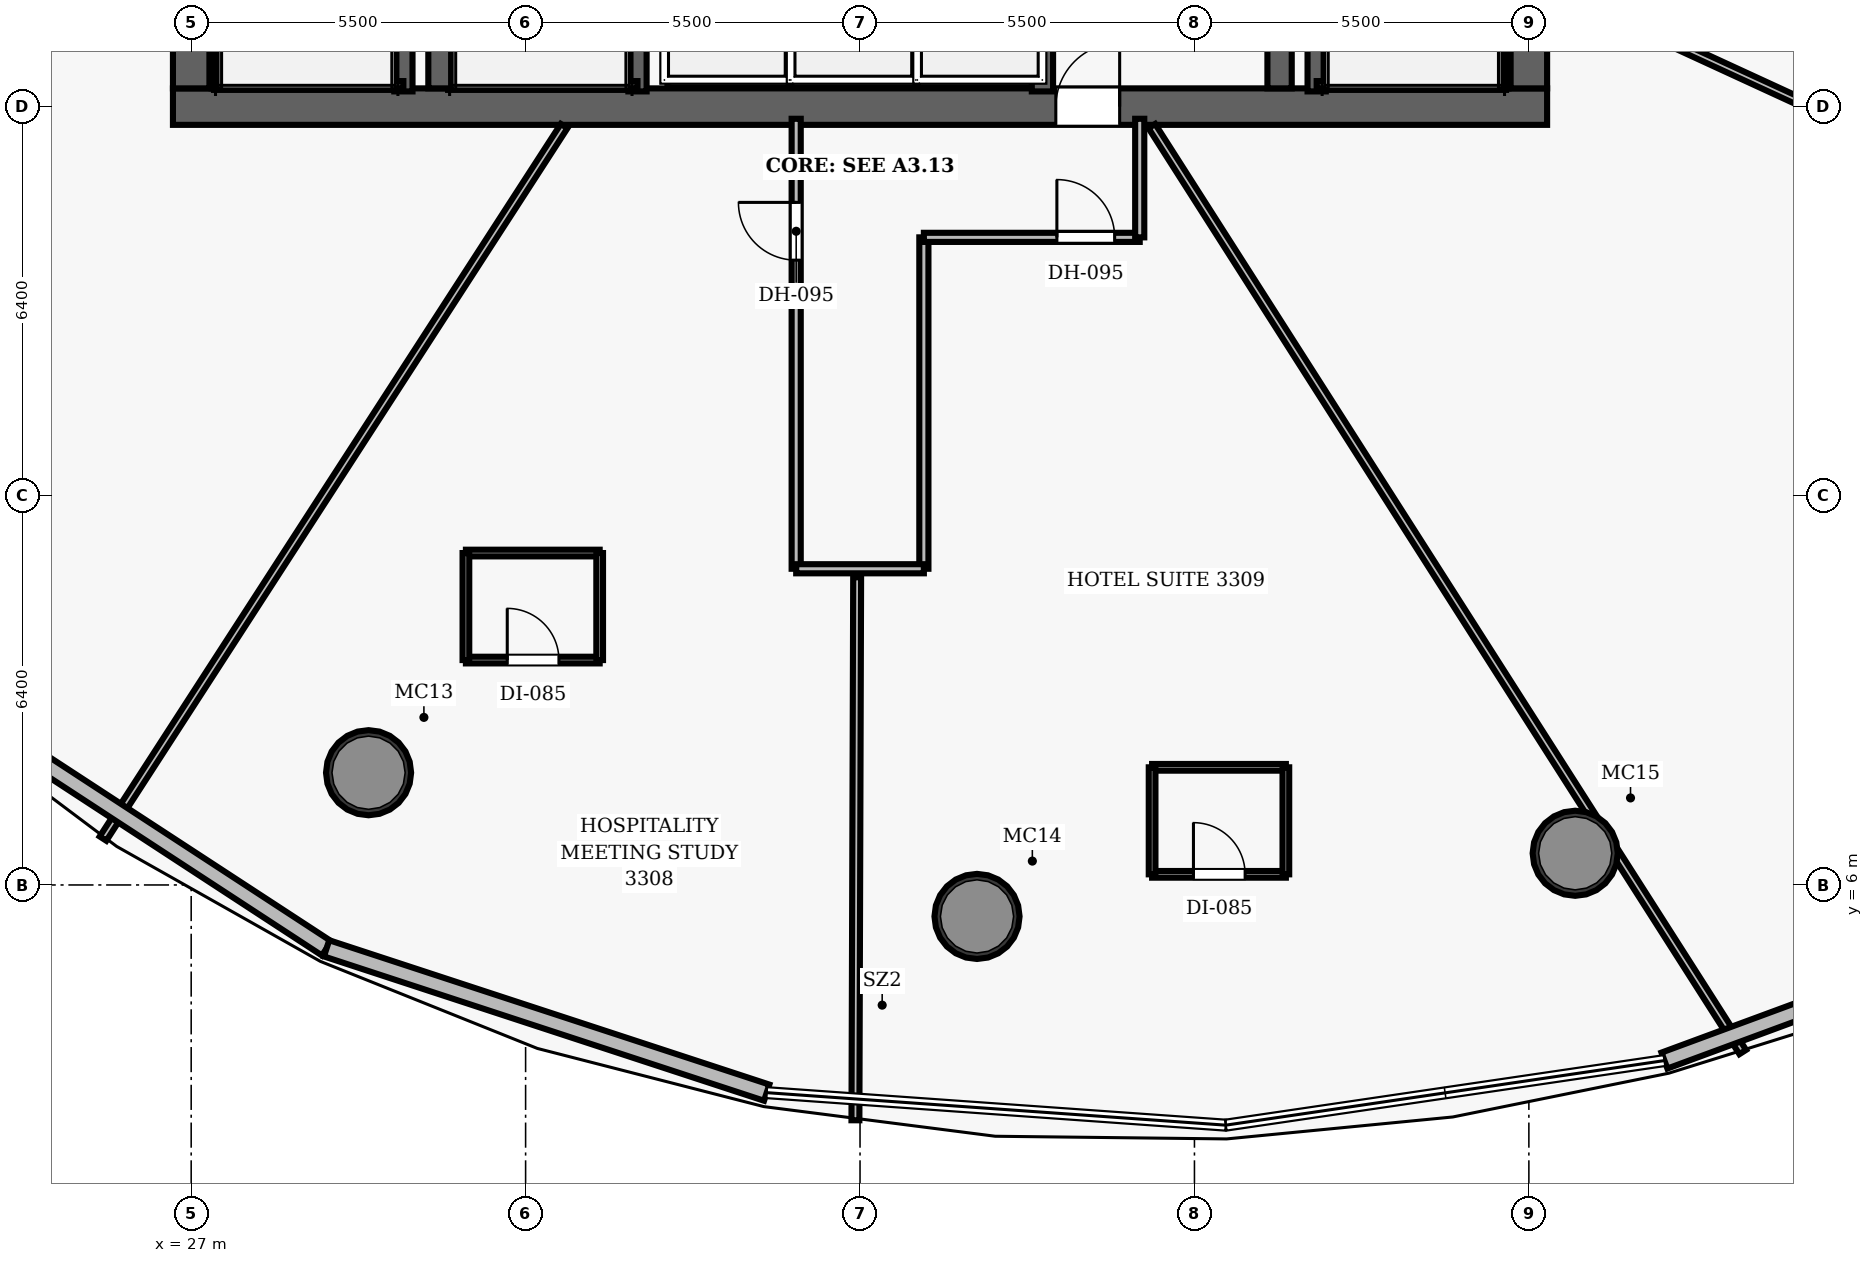
"""IFC4 building model, lengths in metres.
Left out: names, types, materials, properties, quantities, classifications, styles, units other than length and angle.
Written with IfcOpenShell. Run it as: python <this file> out.ifc"""

import sys

from ifc_helpers import new_model, si_unit, direction, frame, frame_2d, origin, origin_2d, place, context, subcontext, project, spatial, rectangle, hollow_circle, extrude, element, fill, save


model = new_model("IFC4")
c1 = context("Model", 3, precision=1e-05, world=origin(), true_north=direction((0.0, 1.0)))
c2 = subcontext(c1, "Body", "Model", "MODEL_VIEW")
j1 = project(units=[si_unit("LENGTHUNIT", "METRE"), si_unit("PLANEANGLEUNIT", "RADIAN")], contexts=[c1])
p1 = place(None, origin())
s1 = spatial("IfcSite", under=j1, at=p1, CompositionType="ELEMENT")
p2 = place(p1, origin())
s2 = spatial("IfcBuilding", under=s1, at=p2, CompositionType="ELEMENT")
p3 = place(p2, frame((0.0, 0.0, 134.3)))
s3 = spatial("IfcBuildingStorey", under=s2, at=p3, CompositionType="ELEMENT", Elevation=134.3)
p4 = place(p3, frame((26.7, 18.8, 0.0), z_axis=(0.0, 0.0, 1.0), x_axis=(1.0, 0.0, 0.0)))
e1 = element("IfcWall", 1, at=p4, inside=s3, PredefinedType="SHEAR", context=c2, shape_type="SweptSolid", body=[
    extrude(rectangle(XDim=22.6, YDim=0.6, at=frame_2d((11.3, 0.0))), origin(), (0.0, 0.0, 1.0), 3.5),
])
p5 = place(p4, frame((14.52, 0.0, 0.0)))
e2 = element("IfcOpeningElement", 2, at=p5, cuts=e1, PredefinedType="OPENING", context=c2, shape_type="SweptSolid", body=[
    extrude(rectangle(XDim=1.05, YDim=2.15, at=frame_2d((0.525, 1.075))), frame((0.0, 0.31, 0.0), z_axis=(0.0, -1.0, 0.0), x_axis=(1.0, 0.0, 0.0)), (0.0, 0.0, 1.0), 0.62),
])
p6 = place(p3, frame((27.0, 19.1, 0.0), z_axis=(0.0, 0.0, 1.0), x_axis=(0.0, 1.0, 0.0)))
e3 = element("IfcWall", 3, at=p6, inside=s3, PredefinedType="SHEAR", context=c2, shape_type="SweptSolid", body=[
    extrude(rectangle(XDim=13.8, YDim=0.6, at=frame_2d((6.9, 0.0))), origin(), (0.0, 0.0, 1.0), 3.5),
])
p7 = place(p6, frame((8.2, 0.0, 0.0)))
e4 = element("IfcOpeningElement", 4, at=p7, cuts=e3, PredefinedType="OPENING", context=c2, shape_type="SweptSolid", body=[
    extrude(rectangle(XDim=1.05, YDim=2.15, at=frame_2d((0.525, 1.075))), frame((0.0, 0.31, 0.0), z_axis=(0.0, -1.0, 0.0), x_axis=(1.0, 0.0, 0.0)), (0.0, 0.0, 1.0), 0.62),
])
p8 = place(p3, frame((49.0, 19.1, 0.0), z_axis=(0.0, 0.0, 1.0), x_axis=(0.0, 1.0, 0.0)))
e5 = element("IfcWall", 5, at=p8, inside=s3, PredefinedType="SHEAR", context=c2, shape_type="SweptSolid", body=[
    extrude(rectangle(XDim=13.8, YDim=0.6, at=frame_2d((6.9, 0.0))), origin(), (0.0, 0.0, 1.0), 3.5),
])
p9 = place(p8, frame((8.2, 0.0, 0.0)))
e6 = element("IfcOpeningElement", 6, at=p9, cuts=e5, PredefinedType="OPENING", context=c2, shape_type="SweptSolid", body=[
    extrude(rectangle(XDim=1.05, YDim=2.15, at=frame_2d((0.525, 1.075))), frame((0.0, 0.31, 0.0), z_axis=(0.0, -1.0, 0.0), x_axis=(1.0, 0.0, 0.0)), (0.0, 0.0, 1.0), 0.62),
])
for number, where, z_axis, x_axis in (
    (7, (31.1, 19.1, 0.0), (0.0, 0.0, 1.0), (0.0, 1.0, 0.0)),
    (8, (44.9, 19.1, 0.0), (0.0, 0.0, 1.0), (0.0, 1.0, 0.0)),
):
    element("IfcWall", number, at=place(p3, frame(where, z_axis=z_axis, x_axis=x_axis)), inside=s3, PredefinedType="SHEAR", context=c2, shape_type="SweptSolid", body=[
        extrude(rectangle(XDim=13.8, YDim=0.4, at=frame_2d((6.9, 0.0))), origin(), (0.0, 0.0, 1.0), 3.5),
    ])
for number, where, z_axis, x_axis in (
    (9, (29.917, 7.846, 0.0), (0.0, 0.0, 1.0), (1.0, 0.0, 0.0)),
    (10, (39.924, 5.483, 0.0), (0.0, 0.0, 1.0), (1.0, 0.0, 0.0)),
    (11, (49.762, 6.521, 0.0), (0.0, 0.0, 1.0), (1.0, 0.0, 0.0)),
):
    element("IfcColumn", number, at=place(p3, frame(where, z_axis=z_axis, x_axis=x_axis)), inside=s3, PredefinedType="COLUMN", context=c2, shape_type="SweptSolid", body=[
        extrude(hollow_circle(Radius=0.7, WallThickness=0.055, at=origin_2d()), origin(), (0.0, 0.0, 1.0), 3.5),
    ])
p10 = place(p3, frame((30.49, 19.05, 0.0), z_axis=(0.0, 0.0, 1.0), x_axis=(0.0, 1.0, 0.0)))
e12 = element("IfcWall", 12, at=p10, inside=s3, PredefinedType="SHEAR", context=c2, shape_type="SweptSolid", body=[
    extrude(rectangle(XDim=7.5, YDim=0.3, at=frame_2d((3.75, 0.0))), origin(), (0.0, 0.0, 1.0), 3.5),
])
p11 = place(p3, frame((27.395, 19.1, 0.0), z_axis=(0.0, 0.0, 1.0), x_axis=(0.0, 1.0, 0.0)))
e13 = element("IfcWall", 13, at=p11, inside=s3, PredefinedType="SHEAR", context=c2, shape_type="SweptSolid", body=[
    extrude(rectangle(XDim=7.45, YDim=0.12, at=frame_2d((3.725, 0.0))), origin(), (0.0, 0.0, 1.0), 3.5),
])
p12 = place(p3, frame((27.395, 19.16, 0.0), z_axis=(0.0, 0.0, 1.0), x_axis=(1.0, 0.0, 0.0)))
e14 = element("IfcWall", 14, at=p12, inside=s3, PredefinedType="SHEAR", context=c2, shape_type="SweptSolid", body=[
    extrude(rectangle(XDim=3.095, YDim=0.12, at=frame_2d((1.547, 0.0))), origin(), (0.0, 0.0, 1.0), 3.5),
])
p13 = place(p3, frame((45.51, 19.05, 0.0), z_axis=(0.0, 0.0, 1.0), x_axis=(0.0, 1.0, 0.0)))
e15 = element("IfcWall", 15, at=p13, inside=s3, PredefinedType="SHEAR", context=c2, shape_type="SweptSolid", body=[
    extrude(rectangle(XDim=7.5, YDim=0.3, at=frame_2d((3.75, 0.0))), origin(), (0.0, 0.0, 1.0), 3.5),
])
p14 = place(p3, frame((48.605, 19.1, 0.0), z_axis=(0.0, 0.0, 1.0), x_axis=(0.0, 1.0, 0.0)))
e16 = element("IfcWall", 16, at=p14, inside=s3, PredefinedType="SHEAR", context=c2, shape_type="SweptSolid", body=[
    extrude(rectangle(XDim=7.45, YDim=0.12, at=frame_2d((3.725, 0.0))), origin(), (0.0, 0.0, 1.0), 3.5),
])
p15 = place(p3, frame((45.51, 19.16, 0.0), z_axis=(0.0, 0.0, 1.0), x_axis=(1.0, 0.0, 0.0)))
e17 = element("IfcWall", 17, at=p15, inside=s3, PredefinedType="SHEAR", context=c2, shape_type="SweptSolid", body=[
    extrude(rectangle(XDim=3.095, YDim=0.12, at=frame_2d((1.547, 0.0))), origin(), (0.0, 0.0, 1.0), 3.5),
])
p16 = place(p3, frame((34.34, 19.05, 0.0), z_axis=(0.0, 0.0, 1.0), x_axis=(0.0, 1.0, 0.0)))
e18 = element("IfcWall", 18, at=p16, inside=s3, PredefinedType="SHEAR", context=c2, shape_type="SweptSolid", body=[
    extrude(rectangle(XDim=7.5, YDim=0.3, at=frame_2d((3.75, 0.0))), origin(), (0.0, 0.0, 1.0), 3.5),
])
p17 = place(p3, frame((31.3, 19.16, 0.0), z_axis=(0.0, 0.0, 1.0), x_axis=(1.0, 0.0, 0.0)))
e19 = element("IfcWall", 19, at=p17, inside=s3, PredefinedType="SHEAR", context=c2, shape_type="SweptSolid", body=[
    extrude(rectangle(XDim=3.04, YDim=0.12, at=frame_2d((1.52, 0.0))), origin(), (0.0, 0.0, 1.0), 3.5),
])
p18 = place(p3, frame((41.0, 19.05, 0.0), z_axis=(0.0, 0.0, 1.0), x_axis=(0.0, 1.0, 0.0)))
e20 = element("IfcWall", 20, at=p18, inside=s3, PredefinedType="SHEAR", context=c2, shape_type="SweptSolid", body=[
    extrude(rectangle(XDim=2.08, YDim=0.35, at=frame_2d((1.04, 0.0))), origin(), (0.0, 0.0, 1.0), 2.675),
])
p19 = place(p3, frame((36.95, 11.2, 0.0), z_axis=(0.0, 0.0, 1.0), x_axis=(0.0, 1.0, 0.0)))
e21 = element("IfcWall", 21, at=p19, inside=s3, PredefinedType="PARTITIONING", context=c2, shape_type="SweptSolid", body=[
    extrude(rectangle(XDim=7.4, YDim=0.15, at=frame_2d((3.7, 0.0))), origin(), (0.0, 0.0, 1.0), 2.675),
])
p20 = place(p19, frame((5.075, 0.0, 0.0)))
e22 = element("IfcOpeningElement", 22, at=p20, cuts=e21, PredefinedType="OPENING", context=c2, shape_type="SweptSolid", body=[
    extrude(rectangle(XDim=0.95, YDim=2.15, at=frame_2d((0.475, 1.075))), frame((0.0, 0.085, 0.0), z_axis=(0.0, -1.0, 0.0), x_axis=(1.0, 0.0, 0.0)), (0.0, 0.0, 1.0), 0.17),
])
p21 = place(p3, frame((39.05, 11.2, 0.0), z_axis=(0.0, 0.0, 1.0), x_axis=(0.0, 1.0, 0.0)))
e23 = element("IfcWall", 23, at=p21, inside=s3, PredefinedType="PARTITIONING", context=c2, shape_type="SweptSolid", body=[
    extrude(rectangle(XDim=5.45, YDim=0.15, at=frame_2d((2.725, 0.0))), origin(), (0.0, 0.0, 1.0), 2.675),
])
p22 = place(p3, frame((39.05, 16.65, 0.0), z_axis=(0.0, 0.0, 1.0), x_axis=(1.0, 0.0, 0.0)))
e24 = element("IfcWall", 24, at=p22, inside=s3, PredefinedType="PARTITIONING", context=c2, shape_type="SweptSolid", body=[
    extrude(rectangle(XDim=3.55, YDim=0.15, at=frame_2d((1.775, 0.0))), origin(), (0.0, 0.0, 1.0), 2.675),
])
p23 = place(p22, frame((2.188, 0.0, 0.0)))
e25 = element("IfcOpeningElement", 25, at=p23, cuts=e24, PredefinedType="OPENING", context=c2, shape_type="SweptSolid", body=[
    extrude(rectangle(XDim=0.95, YDim=2.15, at=frame_2d((0.475, 1.075))), frame((0.0, 0.085, 0.0), z_axis=(0.0, -1.0, 0.0), x_axis=(1.0, 0.0, 0.0)), (0.0, 0.0, 1.0), 0.17),
])
p24 = place(p3, frame((42.6, 16.65, 0.0), z_axis=(0.0, 0.0, 1.0), x_axis=(0.0, 1.0, 0.0)))
e26 = element("IfcWall", 26, at=p24, inside=s3, PredefinedType="PARTITIONING", context=c2, shape_type="SweptSolid", body=[
    extrude(rectangle(XDim=1.95, YDim=0.15, at=frame_2d((0.975, 0.0))), origin(), (0.0, 0.0, 1.0), 2.675),
])
p25 = place(p3, frame((36.95, 11.2, 0.0), z_axis=(0.0, 0.0, 1.0), x_axis=(1.0, 0.0, 0.0)))
e27 = element("IfcWall", 27, at=p25, inside=s3, PredefinedType="PARTITIONING", context=c2, shape_type="SweptSolid", body=[
    extrude(rectangle(XDim=2.1, YDim=0.15, at=frame_2d((1.05, 0.0))), origin(), (0.0, 0.0, 1.0), 2.675),
])
p26 = place(p3, frame((26.68, 20.874, 0.0), z_axis=(0.0, 0.0, 1.0), x_axis=(-0.910944210003, -0.412529570166, 0.0)))
e28 = element("IfcWall", 28, at=p26, inside=s3, PredefinedType="PARTITIONING", context=c2, shape_type="SweptSolid", body=[
    extrude(rectangle(XDim=11.285, YDim=0.13, at=frame_2d((5.643, 0.0))), origin(), (0.0, 0.0, 1.0), 2.675),
])
p27 = place(p3, frame((33.133, 18.48, 0.0), z_axis=(0.0, 0.0, 1.0), x_axis=(-0.543297694795, -0.839540121037, 0.0)))
e29 = element("IfcWall", 29, at=p27, inside=s3, PredefinedType="PARTITIONING", context=c2, shape_type="SweptSolid", body=[
    extrude(rectangle(XDim=13.957, YDim=0.13, at=frame_2d((6.979, 0.0))), origin(), (0.0, 0.0, 1.0), 2.675),
])
p28 = place(p3, frame((37.953, 11.06, 0.0), z_axis=(0.0, 0.0, 1.0), x_axis=(-0.00317137591, -0.999994971175, 0.0)))
e30 = element("IfcWall", 30, at=p28, inside=s3, PredefinedType="PARTITIONING", context=c2, shape_type="SweptSolid", body=[
    extrude(rectangle(XDim=8.93, YDim=0.13, at=frame_2d((4.465, 0.0))), origin(), (0.0, 0.0, 1.0), 2.675),
])
p29 = place(p3, frame((42.799, 18.48, 0.0), z_axis=(0.0, 0.0, 1.0), x_axis=(0.537959445607, -0.842970720063, 0.0)))
e31 = element("IfcWall", 31, at=p29, inside=s3, PredefinedType="PARTITIONING", context=c2, shape_type="SweptSolid", body=[
    extrude(rectangle(XDim=18.064, YDim=0.13, at=frame_2d((9.032, 0.0))), origin(), (0.0, 0.0, 1.0), 2.675),
])
p30 = place(p3, frame((49.32, 20.787, 0.0), z_axis=(0.0, 0.0, 1.0), x_axis=(0.908308798859, -0.418300281993, 0.0)))
e32 = element("IfcWall", 32, at=p30, inside=s3, PredefinedType="PARTITIONING", context=c2, shape_type="SweptSolid", body=[
    extrude(rectangle(XDim=18.123, YDim=0.13, at=frame_2d((9.062, 0.0))), origin(), (0.0, 0.0, 1.0), 2.675),
])
p31 = place(p3, frame((31.518, 9.698, 0.0), z_axis=(0.0, 0.0, 1.0), x_axis=(1.0, 0.0, 0.0)))
e33 = element("IfcWall", 33, at=p31, inside=s3, PredefinedType="PARTITIONING", context=c2, shape_type="SweptSolid", body=[
    extrude(rectangle(XDim=2.2, YDim=0.11, at=frame_2d((1.1, 0.0))), origin(), (0.0, 0.0, 1.0), 2.675),
])
p32 = place(p31, frame((0.68, 0.0, 0.0)))
e34 = element("IfcOpeningElement", 34, at=p32, cuts=e33, PredefinedType="OPENING", context=c2, shape_type="SweptSolid", body=[
    extrude(rectangle(XDim=0.85, YDim=2.1, at=frame_2d((0.425, 1.05))), frame((0.0, 0.065, 0.0), z_axis=(0.0, -1.0, 0.0), x_axis=(1.0, 0.0, 0.0)), (0.0, 0.0, 1.0), 0.13),
])
p33 = place(p3, frame((31.518, 11.458, 0.0), z_axis=(0.0, 0.0, 1.0), x_axis=(1.0, 0.0, 0.0)))
e35 = element("IfcWall", 35, at=p33, inside=s3, PredefinedType="PARTITIONING", context=c2, shape_type="SweptSolid", body=[
    extrude(rectangle(XDim=2.2, YDim=0.11, at=frame_2d((1.1, 0.0))), origin(), (0.0, 0.0, 1.0), 2.675),
])
for number, where, z_axis, x_axis in (
    (36, (31.518, 9.698, 0.0), (0.0, 0.0, 1.0), (0.0, 1.0, 0.0)),
    (37, (33.718, 9.698, 0.0), (0.0, 0.0, 1.0), (0.0, 1.0, 0.0)),
):
    element("IfcWall", number, at=place(p3, frame(where, z_axis=z_axis, x_axis=x_axis)), inside=s3, PredefinedType="PARTITIONING", context=c2, shape_type="SweptSolid", body=[
        extrude(rectangle(XDim=1.76, YDim=0.11, at=frame_2d((0.88, 0.0))), origin(), (0.0, 0.0, 1.0), 2.675),
    ])
p34 = place(p3, frame((42.803, 6.175, 0.0), z_axis=(0.0, 0.0, 1.0), x_axis=(1.0, 0.0, 0.0)))
e38 = element("IfcWall", 38, at=p34, inside=s3, PredefinedType="PARTITIONING", context=c2, shape_type="SweptSolid", body=[
    extrude(rectangle(XDim=2.2, YDim=0.11, at=frame_2d((1.1, 0.0))), origin(), (0.0, 0.0, 1.0), 2.675),
])
p35 = place(p34, frame((0.68, 0.0, 0.0)))
e39 = element("IfcOpeningElement", 39, at=p35, cuts=e38, PredefinedType="OPENING", context=c2, shape_type="SweptSolid", body=[
    extrude(rectangle(XDim=0.85, YDim=2.1, at=frame_2d((0.425, 1.05))), frame((0.0, 0.065, 0.0), z_axis=(0.0, -1.0, 0.0), x_axis=(1.0, 0.0, 0.0)), (0.0, 0.0, 1.0), 0.13),
])
p36 = place(p3, frame((42.803, 7.935, 0.0), z_axis=(0.0, 0.0, 1.0), x_axis=(1.0, 0.0, 0.0)))
e40 = element("IfcWall", 40, at=p36, inside=s3, PredefinedType="PARTITIONING", context=c2, shape_type="SweptSolid", body=[
    extrude(rectangle(XDim=2.2, YDim=0.11, at=frame_2d((1.1, 0.0))), origin(), (0.0, 0.0, 1.0), 2.675),
])
for number, where, z_axis, x_axis in (
    (41, (42.803, 6.175, 0.0), (0.0, 0.0, 1.0), (0.0, 1.0, 0.0)),
    (42, (45.003, 6.175, 0.0), (0.0, 0.0, 1.0), (0.0, 1.0, 0.0)),
):
    element("IfcWall", number, at=place(p3, frame(where, z_axis=z_axis, x_axis=x_axis)), inside=s3, PredefinedType="PARTITIONING", context=c2, shape_type="SweptSolid", body=[
        extrude(rectangle(XDim=1.76, YDim=0.11, at=frame_2d((0.88, 0.0))), origin(), (0.0, 0.0, 1.0), 2.675),
    ])
p37 = place(p3, frame((29.227, 4.958, 0.0), z_axis=(0.0, 0.0, 1.0), x_axis=(-0.837269306741, 0.546790735099, 0.0)))
e43 = element("IfcWall", 43, at=p37, inside=s3, PredefinedType="SOLIDWALL", context=c2, shape_type="SweptSolid", body=[
    extrude(rectangle(XDim=7.617, YDim=0.28, at=frame_2d((3.809, 0.0))), origin(), (0.0, 0.0, 1.0), 3.26),
])
p38 = place(p3, frame((36.465, 2.584, 0.0), z_axis=(0.0, 0.0, 1.0), x_axis=(-0.950226274454, 0.31156063188, 0.0)))
e44 = element("IfcWall", 44, at=p38, inside=s3, PredefinedType="SOLIDWALL", context=c2, shape_type="SweptSolid", body=[
    extrude(rectangle(XDim=7.617, YDim=0.28, at=frame_2d((3.809, 0.0))), origin(), (0.0, 0.0, 1.0), 3.26),
])
p39 = place(p3, frame((57.482, 5.42, 0.0), z_axis=(0.0, 0.0, 1.0), x_axis=(-0.93811276974, -0.346329945644, 0.0)))
e45 = element("IfcWall", 45, at=p39, inside=s3, PredefinedType="SOLIDWALL", context=c2, shape_type="SweptSolid", body=[
    extrude(rectangle(XDim=6.665, YDim=0.28, at=frame_2d((3.333, 0.0))), origin(), (0.0, 0.0, 1.0), 3.26),
])
p40 = place(p5, origin())
e46 = element("IfcDoor", 46, at=p40, inside=s3, OperationType="SINGLE_SWING_RIGHT", PredefinedType="DOOR", context=c2, shape_type="SweptSolid", body=[
    extrude(rectangle(XDim=1.05, YDim=2.15, at=frame_2d((0.525, 1.075))), frame((0.0, 0.025, 0.0), z_axis=(0.0, -1.0, 0.0), x_axis=(1.0, 0.0, 0.0)), (0.0, 0.0, 1.0), 0.05),
])
fill(e2, e46)
p41 = place(p20, origin())
e47 = element("IfcDoor", 47, at=p41, inside=s3, OperationType="SINGLE_SWING_RIGHT", PredefinedType="DOOR", context=c2, shape_type="SweptSolid", body=[
    extrude(rectangle(XDim=0.95, YDim=2.15, at=frame_2d((0.475, 1.075))), frame((0.0, 0.025, 0.0), z_axis=(0.0, -1.0, 0.0), x_axis=(1.0, 0.0, 0.0)), (0.0, 0.0, 1.0), 0.05),
])
fill(e22, e47)
p42 = place(p32, origin())
e48 = element("IfcDoor", 48, at=p42, inside=s3, OperationType="SINGLE_SWING_LEFT", PredefinedType="DOOR", context=c2, shape_type="SweptSolid", body=[
    extrude(rectangle(XDim=0.85, YDim=2.1, at=frame_2d((0.425, 1.05))), frame((0.0, 0.025, 0.0), z_axis=(0.0, -1.0, 0.0), x_axis=(1.0, 0.0, 0.0)), (0.0, 0.0, 1.0), 0.05),
])
fill(e34, e48)
p43 = place(p23, origin())
e49 = element("IfcDoor", 49, at=p43, inside=s3, OperationType="SINGLE_SWING_LEFT", PredefinedType="DOOR", context=c2, shape_type="SweptSolid", body=[
    extrude(rectangle(XDim=0.95, YDim=2.15, at=frame_2d((0.475, 1.075))), frame((0.0, 0.025, 0.0), z_axis=(0.0, -1.0, 0.0), x_axis=(1.0, 0.0, 0.0)), (0.0, 0.0, 1.0), 0.05),
])
fill(e25, e49)
p44 = place(p35, origin())
e50 = element("IfcDoor", 50, at=p44, inside=s3, OperationType="SINGLE_SWING_LEFT", PredefinedType="DOOR", context=c2, shape_type="SweptSolid", body=[
    extrude(rectangle(XDim=0.85, YDim=2.1, at=frame_2d((0.425, 1.05))), frame((0.0, 0.025, 0.0), z_axis=(0.0, -1.0, 0.0), x_axis=(1.0, 0.0, 0.0)), (0.0, 0.0, 1.0), 0.05),
])
fill(e39, e50)
save(model, sys.argv[1])
